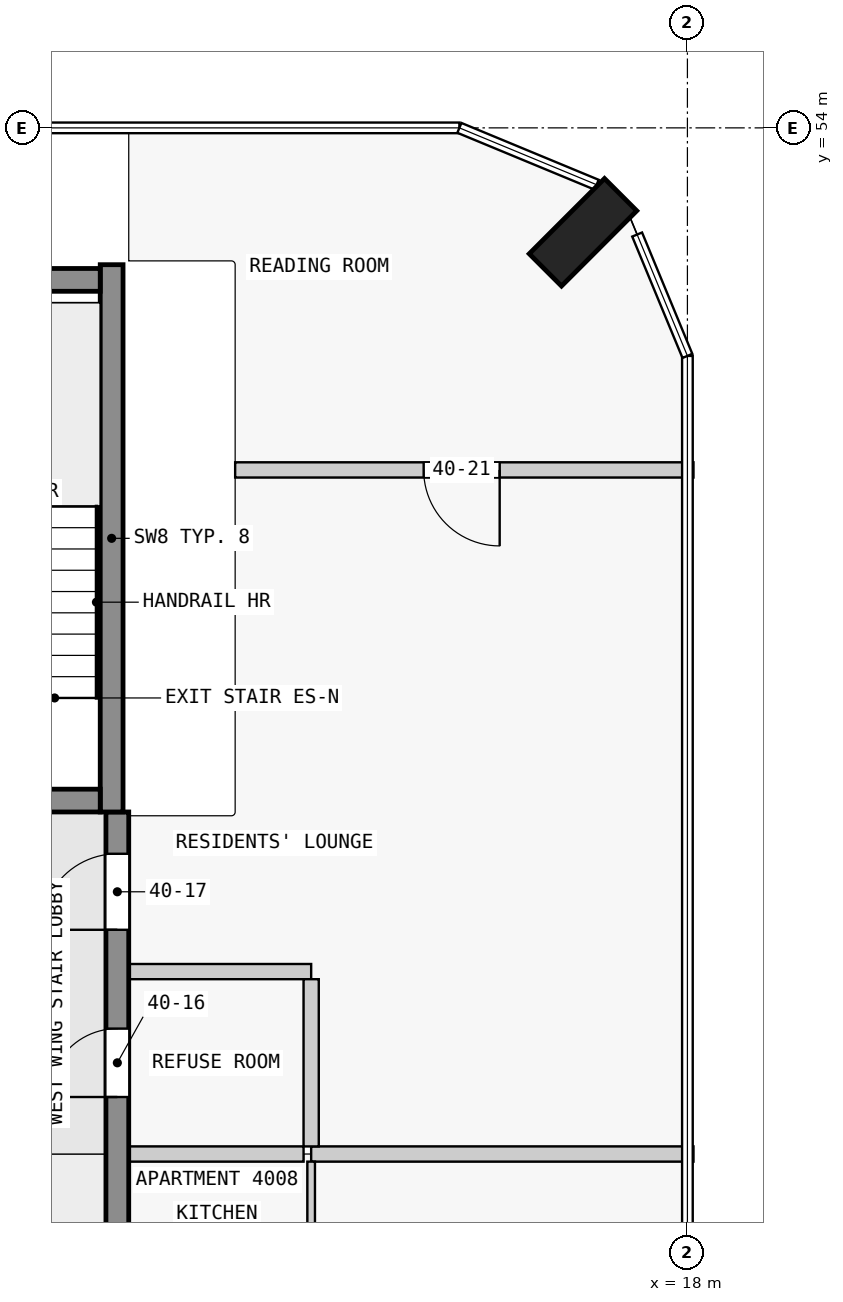
"""IFC4 building model, lengths in metres.
Left out: names, types, materials, properties, quantities, classifications, styles, units other than length and angle.
Written with IfcOpenShell. Run it as: python <this file> out.ifc"""

import sys

from ifc_helpers import new_model, si_unit, direction, frame, frame_2d, origin, origin_2d, place, context, subcontext, project, spatial, rectangle, extrude, element, fill, save


model = new_model("IFC4")
c1 = context("Model", 3, precision=1e-05, world=origin(), true_north=direction((0.0, 1.0)))
c2 = subcontext(c1, "Body", "Model", "MODEL_VIEW")
j1 = project(units=[si_unit("LENGTHUNIT", "METRE"), si_unit("PLANEANGLEUNIT", "RADIAN")], contexts=[c1])
p1 = place(None, origin())
s1 = spatial("IfcSite", under=j1, at=p1, CompositionType="ELEMENT")
p2 = place(p1, origin())
s2 = spatial("IfcBuilding", under=s1, at=p2, CompositionType="ELEMENT")
p3 = place(p2, frame((0.0, 0.0, 156.9)))
s3 = spatial("IfcBuildingStorey", under=s2, at=p3, CompositionType="ELEMENT", Elevation=156.9)
p4 = place(p3, frame((16.626, 52.626, 0.0), z_axis=(0.0, 0.0, 1.0), x_axis=(-0.707106781187, 0.707106781187, 0.0)))
e1 = element("IfcColumn", 1, at=p4, inside=s3, PredefinedType="COLUMN", context=c2, shape_type="SweptSolid", body=[
    extrude(rectangle(XDim=0.6, YDim=1.4, at=origin_2d()), origin(), (0.0, 0.0, 1.0), 3.5),
])
p5 = place(p3, frame((7.725, 45.15, 0.0), z_axis=(0.0, 0.0, 1.0), x_axis=(1.0, 0.0, 0.0)))
e2 = element("IfcWall", 2, at=p5, inside=s3, PredefinedType="SHEAR", context=c2, shape_type="SweptSolid", body=[
    extrude(rectangle(XDim=2.55, YDim=0.3, at=frame_2d((1.275, 0.0))), origin(), (0.0, 0.0, 1.0), 3.5),
])
p6 = place(p5, frame((0.725, 0.0, 0.0)))
e3 = element("IfcOpeningElement", 3, at=p6, cuts=e2, PredefinedType="OPENING", context=c2, shape_type="SweptSolid", body=[
    extrude(rectangle(XDim=1.1, YDim=2.1, at=frame_2d((0.55, 1.05))), frame((0.0, 0.16, 0.0), z_axis=(0.0, -1.0, 0.0), x_axis=(1.0, 0.0, 0.0)), (0.0, 0.0, 1.0), 0.32),
])
p7 = place(p3, frame((7.725, 52.0, 0.0), z_axis=(0.0, 0.0, 1.0), x_axis=(1.0, 0.0, 0.0)))
e4 = element("IfcWall", 4, at=p7, inside=s3, PredefinedType="SHEAR", context=c2, shape_type="SweptSolid", body=[
    extrude(rectangle(XDim=2.55, YDim=0.3, at=frame_2d((1.275, 0.0))), origin(), (0.0, 0.0, 1.0), 3.5),
])
p8 = place(p3, frame((10.425, 45.0, 0.0), z_axis=(0.0, 0.0, 1.0), x_axis=(0.0, 1.0, 0.0)))
e5 = element("IfcWall", 5, at=p8, inside=s3, PredefinedType="SHEAR", context=c2, shape_type="SweptSolid", body=[
    extrude(rectangle(XDim=7.2, YDim=0.3, at=frame_2d((3.6, 0.0))), origin(), (0.0, 0.0, 1.0), 3.5),
])
p9 = place(p3, frame((10.5, 18.0, 0.0), z_axis=(0.0, 0.0, 1.0), x_axis=(0.0, 1.0, 0.0)))
e6 = element("IfcWall", 6, at=p9, inside=s3, PredefinedType="SHEAR", context=c2, shape_type="SweptSolid", body=[
    extrude(rectangle(XDim=27.0, YDim=0.3, at=frame_2d((13.5, 0.0))), origin(), (0.0, 0.0, 1.0), 3.25),
])
p10 = place(p9, frame((1.85, 0.0, 0.0)))
e7 = element("IfcOpeningElement", 7, at=p10, cuts=e6, PredefinedType="OPENING", context=c2, shape_type="SweptSolid", body=[
    extrude(rectangle(XDim=0.9, YDim=2.1, at=frame_2d((0.45, 1.05))), frame((0.0, 0.16, 0.0), z_axis=(0.0, -1.0, 0.0), x_axis=(1.0, 0.0, 0.0)), (0.0, 0.0, 1.0), 0.32),
])
p11 = place(p9, frame((6.25, 0.0, 0.0)))
e8 = element("IfcOpeningElement", 8, at=p11, cuts=e6, PredefinedType="OPENING", context=c2, shape_type="SweptSolid", body=[
    extrude(rectangle(XDim=1.0, YDim=2.1, at=frame_2d((0.5, 1.05))), frame((0.0, 0.16, 0.0), z_axis=(0.0, -1.0, 0.0), x_axis=(1.0, 0.0, 0.0)), (0.0, 0.0, 1.0), 0.32),
])
p12 = place(p9, frame((10.85, 0.0, 0.0)))
e9 = element("IfcOpeningElement", 9, at=p12, cuts=e6, PredefinedType="OPENING", context=c2, shape_type="SweptSolid", body=[
    extrude(rectangle(XDim=0.9, YDim=2.1, at=frame_2d((0.45, 1.05))), frame((0.0, 0.16, 0.0), z_axis=(0.0, -1.0, 0.0), x_axis=(1.0, 0.0, 0.0)), (0.0, 0.0, 1.0), 0.32),
])
p13 = place(p9, frame((17.55, 0.0, 0.0)))
e10 = element("IfcOpeningElement", 10, at=p13, cuts=e6, PredefinedType="OPENING", context=c2, shape_type="SweptSolid", body=[
    extrude(rectangle(XDim=1.0, YDim=2.1, at=frame_2d((0.5, 1.05))), frame((0.0, 0.16, 0.0), z_axis=(0.0, -1.0, 0.0), x_axis=(1.0, 0.0, 0.0)), (0.0, 0.0, 1.0), 0.32),
])
p14 = place(p9, frame((23.25, 0.0, 0.0)))
e11 = element("IfcOpeningElement", 11, at=p14, cuts=e6, PredefinedType="OPENING", context=c2, shape_type="SweptSolid", body=[
    extrude(rectangle(XDim=0.9, YDim=2.1, at=frame_2d((0.45, 1.05))), frame((0.0, 0.16, 0.0), z_axis=(0.0, -1.0, 0.0), x_axis=(1.0, 0.0, 0.0)), (0.0, 0.0, 1.0), 0.32),
])
p15 = place(p9, frame((25.45, 0.0, 0.0)))
e12 = element("IfcOpeningElement", 12, at=p15, cuts=e6, PredefinedType="OPENING", context=c2, shape_type="SweptSolid", body=[
    extrude(rectangle(XDim=1.0, YDim=2.1, at=frame_2d((0.5, 1.05))), frame((0.0, 0.16, 0.0), z_axis=(0.0, -1.0, 0.0), x_axis=(1.0, 0.0, 0.0)), (0.0, 0.0, 1.0), 0.32),
])
p16 = place(p3, frame((12.95, 40.5, 0.0), z_axis=(0.0, 0.0, 1.0), x_axis=(-1.0, 0.0, 0.0)))
e13 = element("IfcWall", 13, at=p16, inside=s3, PredefinedType="PARTITIONING", context=c2, shape_type="SweptSolid", body=[
    extrude(rectangle(XDim=2.3, YDim=0.2, at=frame_2d((1.15, 0.0))), origin(), (0.0, 0.0, 1.0), 3.25),
])
p17 = place(p3, frame((13.05, 40.5, 0.0), z_axis=(0.0, 0.0, 1.0), x_axis=(1.0, 0.0, 0.0)))
e14 = element("IfcWall", 14, at=p17, inside=s3, PredefinedType="PARTITIONING", context=c2, shape_type="SweptSolid", body=[
    extrude(rectangle(XDim=5.03, YDim=0.2, at=frame_2d((2.515, 0.0))), origin(), (0.0, 0.0, 1.0), 3.25),
])
p18 = place(p3, frame((13.05, 42.9, 0.0), z_axis=(0.0, 0.0, 1.0), x_axis=(-1.0, 0.0, 0.0)))
e15 = element("IfcWall", 15, at=p18, inside=s3, PredefinedType="PARTITIONING", context=c2, shape_type="SweptSolid", body=[
    extrude(rectangle(XDim=2.4, YDim=0.2, at=frame_2d((1.2, 0.0))), origin(), (0.0, 0.0, 1.0), 3.25),
])
p19 = place(p3, frame((18.08, 49.5, 0.0), z_axis=(0.0, 0.0, 1.0), x_axis=(-1.0, 0.0, 0.0)))
e16 = element("IfcWall", 16, at=p19, inside=s3, PredefinedType="PARTITIONING", context=c2, shape_type="SweptSolid", body=[
    extrude(rectangle(XDim=6.03, YDim=0.2, at=frame_2d((3.015, 0.0))), origin(), (0.0, 0.0, 1.0), 3.25),
])
p20 = place(p19, frame((2.55, 0.0, 0.0)))
e17 = element("IfcOpeningElement", 17, at=p20, cuts=e16, PredefinedType="OPENING", context=c2, shape_type="SweptSolid", body=[
    extrude(rectangle(XDim=1.0, YDim=2.1, at=frame_2d((0.5, 1.05))), frame((0.0, 0.11, 0.0), z_axis=(0.0, -1.0, 0.0), x_axis=(1.0, 0.0, 0.0)), (0.0, 0.0, 1.0), 0.22),
])
p21 = place(p3, frame((13.05, 38.75, 0.0), z_axis=(0.0, 0.0, 1.0), x_axis=(0.0, 1.0, 0.0)))
e18 = element("IfcWall", 18, at=p21, inside=s3, PredefinedType="PARTITIONING", context=c2, shape_type="SweptSolid", body=[
    extrude(rectangle(XDim=1.65, YDim=0.1, at=frame_2d((0.825, 0.0))), origin(), (0.0, 0.0, 1.0), 3.25),
])
p22 = place(p3, frame((13.05, 40.6, 0.0), z_axis=(0.0, 0.0, 1.0), x_axis=(0.0, 1.0, 0.0)))
e19 = element("IfcWall", 19, at=p22, inside=s3, PredefinedType="PARTITIONING", context=c2, shape_type="SweptSolid", body=[
    extrude(rectangle(XDim=2.2, YDim=0.2, at=frame_2d((1.1, 0.0))), origin(), (0.0, 0.0, 1.0), 3.25),
])
p23 = place(p14, origin())
e20 = element("IfcDoor", 20, at=p23, inside=s3, OperationType="SINGLE_SWING_RIGHT", PredefinedType="DOOR", context=c2, shape_type="SweptSolid", body=[
    extrude(rectangle(XDim=0.9, YDim=2.1, at=frame_2d((0.45, 1.05))), frame((0.0, 0.025, 0.0), z_axis=(0.0, -1.0, 0.0), x_axis=(1.0, 0.0, 0.0)), (0.0, 0.0, 1.0), 0.05),
])
fill(e11, e20)
p24 = place(p15, origin())
e21 = element("IfcDoor", 21, at=p24, inside=s3, OperationType="SINGLE_SWING_RIGHT", PredefinedType="DOOR", context=c2, shape_type="SweptSolid", body=[
    extrude(rectangle(XDim=1.0, YDim=2.1, at=frame_2d((0.5, 1.05))), frame((0.0, 0.025, 0.0), z_axis=(0.0, -1.0, 0.0), x_axis=(1.0, 0.0, 0.0)), (0.0, 0.0, 1.0), 0.05),
])
fill(e12, e21)
p25 = place(p20, origin())
e22 = element("IfcDoor", 22, at=p25, inside=s3, OperationType="SINGLE_SWING_RIGHT", PredefinedType="DOOR", context=c2, shape_type="SweptSolid", body=[
    extrude(rectangle(XDim=1.0, YDim=2.1, at=frame_2d((0.5, 1.05))), frame((0.0, 0.025, 0.0), z_axis=(0.0, -1.0, 0.0), x_axis=(1.0, 0.0, 0.0)), (0.0, 0.0, 1.0), 0.05),
])
fill(e17, e22)
save(model, sys.argv[1])
